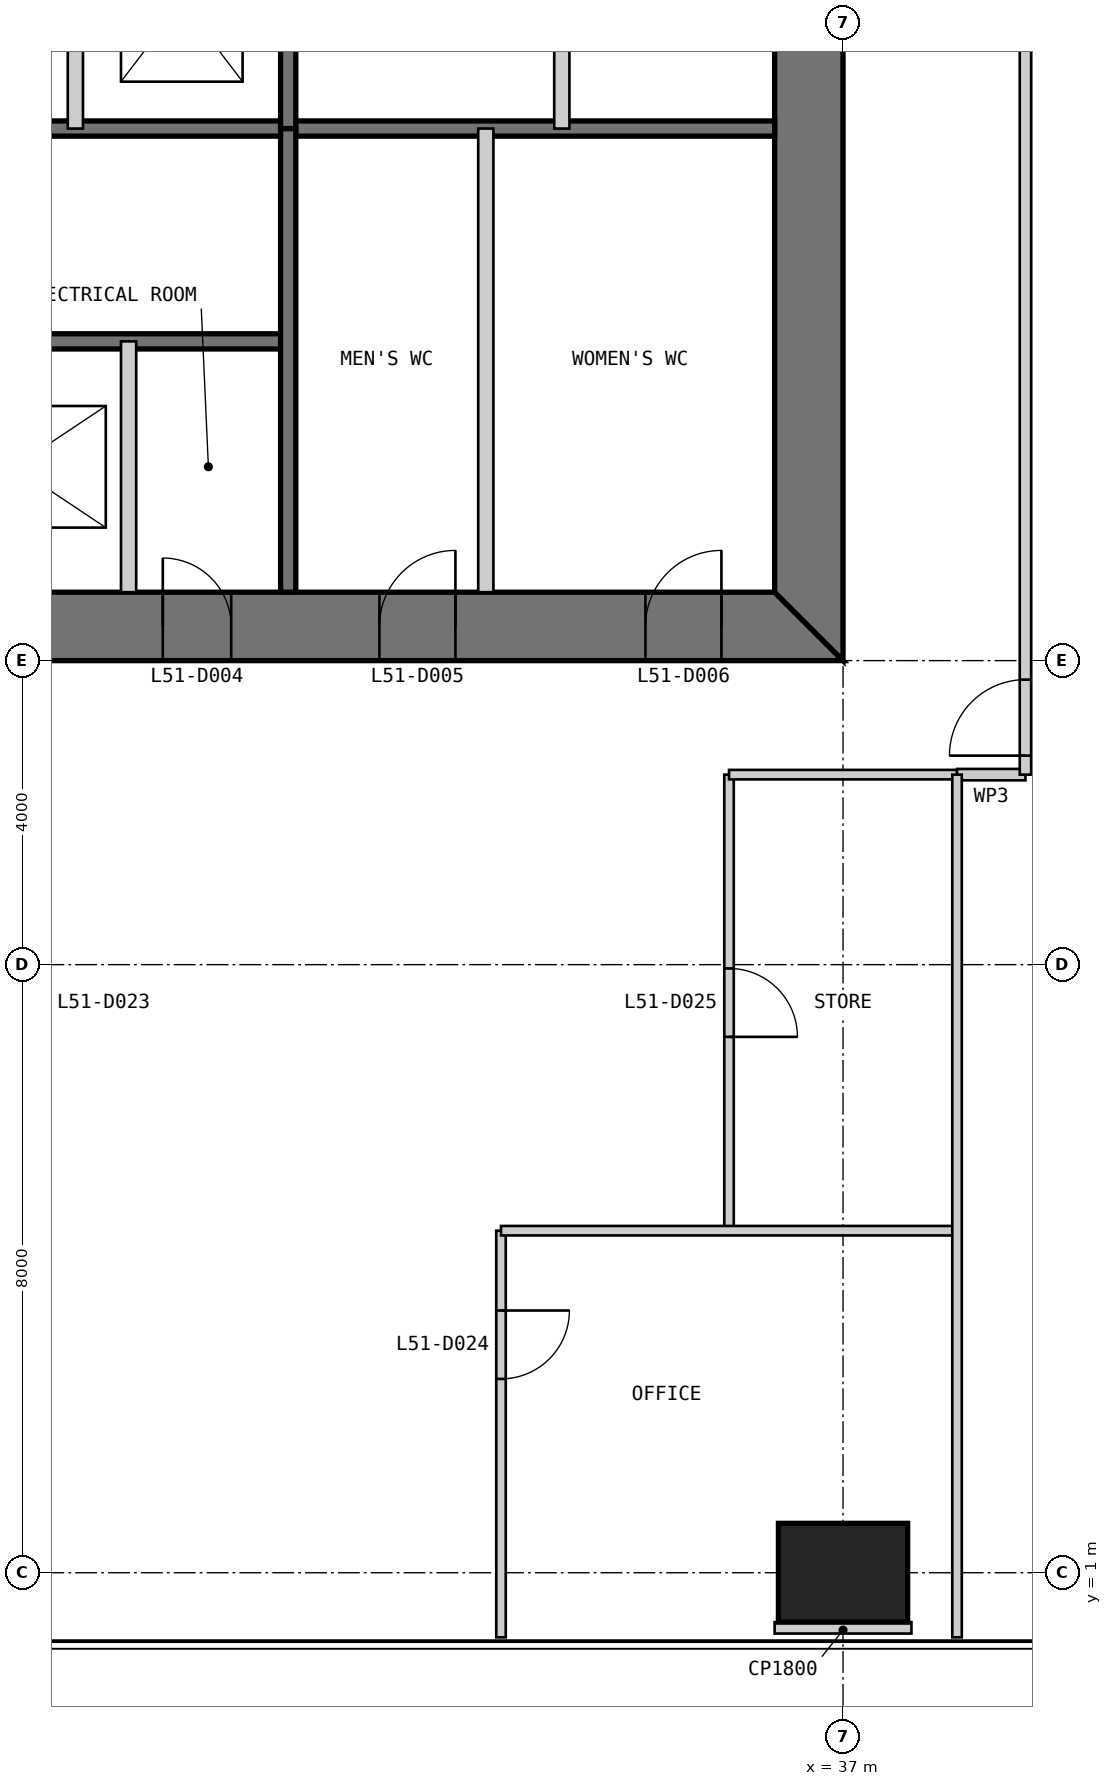
"""IFC4 building model, lengths in metres.
Left out: names, types, materials, properties, quantities, classifications, styles, units other than length and angle.
Written with IfcOpenShell. Run it as: python <this file> out.ifc"""

import sys

from ifc_helpers import new_model, si_unit, direction, frame, frame_2d, origin, origin_2d, place, context, subcontext, project, spatial, polyline, rectangle, outline, extrude, element, fill, save


model = new_model("IFC4")
c1 = context("Model", 3, precision=1e-05, world=origin(), true_north=direction((0.0, 1.0)))
c2 = subcontext(c1, "Body", "Model", "MODEL_VIEW")
j1 = project(units=[si_unit("LENGTHUNIT", "METRE"), si_unit("PLANEANGLEUNIT", "RADIAN")], contexts=[c1])
p1 = place(None, origin())
s1 = spatial("IfcSite", under=j1, at=p1, CompositionType="ELEMENT")
p2 = place(p1, origin())
s2 = spatial("IfcBuilding", under=s1, at=p2, CompositionType="ELEMENT")
p3 = place(p2, frame((0.0, 0.0, 217.8)))
s3 = spatial("IfcBuildingStorey", under=s2, at=p3, CompositionType="ELEMENT", Elevation=217.8)
p4 = place(p3, frame((37.0, 1.0, 0.0), z_axis=(0.0, 0.0, 1.0), x_axis=(1.0, 0.0, 0.0)))
e1 = element("IfcColumn", 1, at=p4, inside=s3, PredefinedType="COLUMN", context=c2, shape_type="SweptSolid", body=[
    extrude(rectangle(XDim=1.7, YDim=1.3, at=origin_2d()), origin(), (0.0, 0.0, 1.0), 4.0),
])
p5 = place(p3, frame((13.0, 13.45, 0.0), z_axis=(0.0, 0.0, 1.0), x_axis=(1.0, 0.0, 0.0)))
e2 = element("IfcWall", 2, at=p5, inside=s3, PredefinedType="SHEAR", context=c2, shape_type="SweptSolid", body=[
    extrude(outline(polyline([(0.0, -0.45), (24.0, -0.45), (23.1, 0.45), (0.9, 0.45), (0.0, -0.45)])), origin(), (0.0, 0.0, 1.0), 4.0),
])
p6 = place(p5, frame((4.9, 0.0, 0.0)))
e3 = element("IfcOpeningElement", 3, at=p6, cuts=e2, PredefinedType="OPENING", context=c2, shape_type="SweptSolid", body=[
    extrude(rectangle(XDim=1.0, YDim=2.2, at=frame_2d((0.5, 1.1))), frame((0.0, 0.46, 0.0), z_axis=(0.0, -1.0, 0.0), x_axis=(1.0, 0.0, 0.0)), (0.0, 0.0, 1.0), 0.92),
])
p7 = place(p5, frame((8.9, 0.0, 0.0)))
e4 = element("IfcOpeningElement", 4, at=p7, cuts=e2, PredefinedType="OPENING", context=c2, shape_type="SweptSolid", body=[
    extrude(rectangle(XDim=1.1, YDim=2.2, at=frame_2d((0.55, 1.1))), frame((0.0, 0.46, 0.0), z_axis=(0.0, -1.0, 0.0), x_axis=(1.0, 0.0, 0.0)), (0.0, 0.0, 1.0), 0.92),
])
p8 = place(p5, frame((15.05, 0.0, 0.0)))
e5 = element("IfcOpeningElement", 5, at=p8, cuts=e2, PredefinedType="OPENING", context=c2, shape_type="SweptSolid", body=[
    extrude(rectangle(XDim=0.9, YDim=2.2, at=frame_2d((0.45, 1.1))), frame((0.0, 0.46, 0.0), z_axis=(0.0, -1.0, 0.0), x_axis=(1.0, 0.0, 0.0)), (0.0, 0.0, 1.0), 0.92),
])
p9 = place(p5, frame((17.9, 0.0, 0.0)))
e6 = element("IfcOpeningElement", 6, at=p9, cuts=e2, PredefinedType="OPENING", context=c2, shape_type="SweptSolid", body=[
    extrude(rectangle(XDim=1.0, YDim=2.2, at=frame_2d((0.5, 1.1))), frame((0.0, 0.46, 0.0), z_axis=(0.0, -1.0, 0.0), x_axis=(1.0, 0.0, 0.0)), (0.0, 0.0, 1.0), 0.92),
])
p10 = place(p5, frame((21.4, 0.0, 0.0)))
e7 = element("IfcOpeningElement", 7, at=p10, cuts=e2, PredefinedType="OPENING", context=c2, shape_type="SweptSolid", body=[
    extrude(rectangle(XDim=1.0, YDim=2.2, at=frame_2d((0.5, 1.1))), frame((0.0, 0.46, 0.0), z_axis=(0.0, -1.0, 0.0), x_axis=(1.0, 0.0, 0.0)), (0.0, 0.0, 1.0), 0.92),
])
p11 = place(p3, frame((36.55, 13.9, 0.0), z_axis=(0.0, 0.0, 1.0), x_axis=(0.0, 1.0, 0.0)))
e8 = element("IfcWall", 8, at=p11, inside=s3, PredefinedType="SHEAR", context=c2, shape_type="SweptSolid", body=[
    extrude(outline(polyline([(-0.9, -0.45), (23.1, -0.45), (22.2, 0.45), (0.0, 0.45), (-0.9, -0.45)])), origin(), (0.0, 0.0, 1.0), 4.0),
])
p12 = place(p11, frame((20.2, 0.0, 0.0)))
e9 = element("IfcOpeningElement", 9, at=p12, cuts=e8, PredefinedType="OPENING", context=c2, shape_type="SweptSolid", body=[
    extrude(rectangle(XDim=1.0, YDim=2.2, at=frame_2d((0.5, 1.1))), frame((0.0, 0.46, 0.0), z_axis=(0.0, -1.0, 0.0), x_axis=(1.0, 0.0, 0.0)), (0.0, 0.0, 1.0), 0.92),
])
p13 = place(p11, frame((17.25, 0.0, 0.0)))
e10 = element("IfcOpeningElement", 10, at=p13, cuts=e8, PredefinedType="OPENING", context=c2, shape_type="SweptSolid", body=[
    extrude(rectangle(XDim=0.9, YDim=2.2, at=frame_2d((0.45, 1.1))), frame((0.0, 0.46, 0.0), z_axis=(0.0, -1.0, 0.0), x_axis=(1.0, 0.0, 0.0)), (0.0, 0.0, 1.0), 0.92),
])
p14 = place(p3, frame((20.3, 17.2, 0.0), z_axis=(0.0, 0.0, 1.0), x_axis=(1.0, 0.0, 0.0)))
e11 = element("IfcWall", 11, at=p14, inside=s3, PredefinedType="SOLIDWALL", context=c2, shape_type="SweptSolid", body=[
    extrude(rectangle(XDim=9.4, YDim=0.2, at=frame_2d((4.7, 0.0))), origin(), (0.0, 0.0, 1.0), 3.8),
])
p15 = place(p14, frame((0.25, 0.0, 0.0)))
e12 = element("IfcOpeningElement", 12, at=p15, cuts=e11, PredefinedType="OPENING", context=c2, shape_type="SweptSolid", body=[
    extrude(rectangle(XDim=1.0, YDim=2.2, at=frame_2d((0.5, 1.1))), frame((0.0, 0.11, 0.0), z_axis=(0.0, -1.0, 0.0), x_axis=(1.0, 0.0, 0.0)), (0.0, 0.0, 1.0), 0.22),
])
p16 = place(p3, frame((20.3, 20.0, 0.0), z_axis=(0.0, 0.0, 1.0), x_axis=(1.0, 0.0, 0.0)))
e13 = element("IfcWall", 13, at=p16, inside=s3, PredefinedType="SOLIDWALL", context=c2, shape_type="SweptSolid", body=[
    extrude(rectangle(XDim=15.8, YDim=0.2, at=frame_2d((7.9, 0.0))), origin(), (0.0, 0.0, 1.0), 3.8),
])
p17 = place(p3, frame((27.6, 13.9, 0.0), z_axis=(0.0, 0.0, 1.0), x_axis=(0.0, 1.0, 0.0)))
e14 = element("IfcWall", 14, at=p17, inside=s3, PredefinedType="PARTITIONING", context=c2, shape_type="SweptSolid", body=[
    extrude(rectangle(XDim=3.3, YDim=0.2, at=frame_2d((1.65, 0.0))), origin(), (0.0, 0.0, 1.0), 3.8),
])
p18 = place(p3, frame((29.7, 13.9, 0.0), z_axis=(0.0, 0.0, 1.0), x_axis=(0.0, 1.0, 0.0)))
e15 = element("IfcWall", 15, at=p18, inside=s3, PredefinedType="SOLIDWALL", context=c2, shape_type="SweptSolid", body=[
    extrude(rectangle(XDim=6.1, YDim=0.2, at=frame_2d((3.05, 0.0))), origin(), (0.0, 0.0, 1.0), 3.8),
])
p19 = place(p3, frame((32.3, 13.9, 0.0), z_axis=(0.0, 0.0, 1.0), x_axis=(0.0, 1.0, 0.0)))
e16 = element("IfcWall", 16, at=p19, inside=s3, PredefinedType="PARTITIONING", context=c2, shape_type="SweptSolid", body=[
    extrude(rectangle(XDim=6.1, YDim=0.2, at=frame_2d((3.05, 0.0))), origin(), (0.0, 0.0, 1.0), 3.8),
])
p20 = place(p3, frame((33.3, 36.1, 0.0), z_axis=(0.0, 0.0, 1.0), x_axis=(0.0, -1.0, 0.0)))
e17 = element("IfcWall", 17, at=p20, inside=s3, PredefinedType="PARTITIONING", context=c2, shape_type="SweptSolid", body=[
    extrude(rectangle(XDim=16.1, YDim=0.2, at=frame_2d((8.05, 0.0))), origin(), (0.0, 0.0, 1.0), 3.8),
])
p21 = place(p20, frame((3.8, 0.0, 0.0)))
e18 = element("IfcOpeningElement", 18, at=p21, cuts=e17, PredefinedType="OPENING", context=c2, shape_type="SweptSolid", body=[
    extrude(rectangle(XDim=0.9, YDim=2.2, at=frame_2d((0.45, 1.1))), frame((0.0, 0.11, 0.0), z_axis=(0.0, -1.0, 0.0), x_axis=(1.0, 0.0, 0.0)), (0.0, 0.0, 1.0), 0.22),
])
p22 = place(p3, frame((29.7, 36.1, 0.0), z_axis=(0.0, 0.0, 1.0), x_axis=(0.0, -1.0, 0.0)))
e19 = element("IfcWall", 19, at=p22, inside=s3, PredefinedType="SOLIDWALL", context=c2, shape_type="SweptSolid", body=[
    extrude(rectangle(XDim=16.1, YDim=0.2, at=frame_2d((8.05, 0.0))), origin(), (0.0, 0.0, 1.0), 3.8),
])
p23 = place(p22, frame((7.217, 0.0, 0.0)))
e20 = element("IfcOpeningElement", 20, at=p23, cuts=e19, PredefinedType="OPENING", context=c2, shape_type="SweptSolid", body=[
    extrude(rectangle(XDim=1.1, YDim=2.2, at=frame_2d((0.55, 1.1))), frame((0.0, 0.11, 0.0), z_axis=(0.0, -1.0, 0.0), x_axis=(1.0, 0.0, 0.0)), (0.0, 0.0, 1.0), 0.22),
])
p24 = place(p22, frame((10.55, 0.0, 0.0)))
e21 = element("IfcOpeningElement", 21, at=p24, cuts=e19, PredefinedType="OPENING", context=c2, shape_type="SweptSolid", body=[
    extrude(rectangle(XDim=1.1, YDim=2.2, at=frame_2d((0.55, 1.1))), frame((0.0, 0.11, 0.0), z_axis=(0.0, -1.0, 0.0), x_axis=(1.0, 0.0, 0.0)), (0.0, 0.0, 1.0), 0.22),
])
p25 = place(p22, frame((13.883, 0.0, 0.0)))
e22 = element("IfcOpeningElement", 22, at=p25, cuts=e19, PredefinedType="OPENING", context=c2, shape_type="SweptSolid", body=[
    extrude(rectangle(XDim=1.1, YDim=2.2, at=frame_2d((0.55, 1.1))), frame((0.0, 0.11, 0.0), z_axis=(0.0, -1.0, 0.0), x_axis=(1.0, 0.0, 0.0)), (0.0, 0.0, 1.0), 0.22),
])
p26 = place(p3, frame((26.9, 30.0, 0.0), z_axis=(0.0, 0.0, 1.0), x_axis=(0.0, -1.0, 0.0)))
e23 = element("IfcWall", 23, at=p26, inside=s3, PredefinedType="PARTITIONING", context=c2, shape_type="SweptSolid", body=[
    extrude(rectangle(XDim=10.0, YDim=0.2, at=frame_2d((5.0, 0.0))), origin(), (0.0, 0.0, 1.0), 3.8),
])
p27 = place(p3, frame((32.5, 0.15, 0.0), z_axis=(0.0, 0.0, 1.0), x_axis=(0.0, 1.0, 0.0)))
e24 = element("IfcWall", 24, at=p27, inside=s3, PredefinedType="PARTITIONING", context=c2, shape_type="SweptSolid", body=[
    extrude(rectangle(XDim=5.35, YDim=0.125, at=frame_2d((2.675, 0.0))), origin(), (0.0, 0.0, 1.0), 3.85),
])
p28 = place(p27, frame((3.4, 0.0, 0.0)))
e25 = element("IfcOpeningElement", 25, at=p28, cuts=e24, PredefinedType="OPENING", context=c2, shape_type="SweptSolid", body=[
    extrude(rectangle(XDim=0.9, YDim=2.2, at=frame_2d((0.45, 1.1))), frame((0.0, 0.073, 0.0), z_axis=(0.0, -1.0, 0.0), x_axis=(1.0, 0.0, 0.0)), (0.0, 0.0, 1.0), 0.145),
])
p29 = place(p3, frame((35.5, 5.5, 0.0), z_axis=(0.0, 0.0, 1.0), x_axis=(0.0, 1.0, 0.0)))
e26 = element("IfcWall", 26, at=p29, inside=s3, PredefinedType="PARTITIONING", context=c2, shape_type="SweptSolid", body=[
    extrude(rectangle(XDim=6.0, YDim=0.125, at=frame_2d((3.0, 0.0))), origin(), (0.0, 0.0, 1.0), 3.85),
])
p30 = place(p29, frame((2.55, 0.0, 0.0)))
e27 = element("IfcOpeningElement", 27, at=p30, cuts=e26, PredefinedType="OPENING", context=c2, shape_type="SweptSolid", body=[
    extrude(rectangle(XDim=0.9, YDim=2.2, at=frame_2d((0.45, 1.1))), frame((0.0, 0.073, 0.0), z_axis=(0.0, -1.0, 0.0), x_axis=(1.0, 0.0, 0.0)), (0.0, 0.0, 1.0), 0.145),
])
p31 = place(p3, frame((32.5, 5.5, 0.0), z_axis=(0.0, 0.0, 1.0), x_axis=(1.0, 0.0, 0.0)))
e28 = element("IfcWall", 28, at=p31, inside=s3, PredefinedType="PARTITIONING", context=c2, shape_type="SweptSolid", body=[
    extrude(rectangle(XDim=6.0, YDim=0.125, at=frame_2d((3.0, 0.0))), origin(), (0.0, 0.0, 1.0), 3.85),
])
p32 = place(p3, frame((35.5, 11.5, 0.0), z_axis=(0.0, 0.0, 1.0), x_axis=(1.0, 0.0, 0.0)))
e29 = element("IfcWall", 29, at=p32, inside=s3, PredefinedType="PARTITIONING", context=c2, shape_type="SweptSolid", body=[
    extrude(rectangle(XDim=3.0, YDim=0.125, at=frame_2d((1.5, 0.0))), origin(), (0.0, 0.0, 1.0), 3.85),
])
p33 = place(p3, frame((38.5, 11.5, 0.0), z_axis=(0.0, 0.0, 1.0), x_axis=(1.0, 0.0, 0.0)))
e30 = element("IfcWall", 30, at=p33, inside=s3, PredefinedType="PARTITIONING", context=c2, shape_type="SweptSolid", body=[
    extrude(rectangle(XDim=0.9, YDim=0.15, at=frame_2d((0.45, 0.0))), origin(), (0.0, 0.0, 1.0), 3.85),
])
p34 = place(p3, frame((39.4, 11.5, 0.0), z_axis=(0.0, 0.0, 1.0), x_axis=(0.0, 1.0, 0.0)))
e31 = element("IfcWall", 31, at=p34, inside=s3, PredefinedType="PARTITIONING", context=c2, shape_type="SweptSolid", body=[
    extrude(rectangle(XDim=27.0, YDim=0.15, at=frame_2d((13.5, 0.0))), origin(), (0.0, 0.0, 1.0), 3.85),
])
p35 = place(p34, frame((0.25, 0.0, 0.0)))
e32 = element("IfcOpeningElement", 32, at=p35, cuts=e31, PredefinedType="OPENING", context=c2, shape_type="SweptSolid", body=[
    extrude(rectangle(XDim=1.0, YDim=2.2, at=frame_2d((0.5, 1.1))), frame((0.0, 0.085, 0.0), z_axis=(0.0, -1.0, 0.0), x_axis=(1.0, 0.0, 0.0)), (0.0, 0.0, 1.0), 0.17),
])
p36 = place(p34, frame((22.75, 0.0, 0.0)))
e33 = element("IfcOpeningElement", 33, at=p36, cuts=e31, PredefinedType="OPENING", context=c2, shape_type="SweptSolid", body=[
    extrude(rectangle(XDim=1.0, YDim=2.2, at=frame_2d((0.5, 1.1))), frame((0.0, 0.085, 0.0), z_axis=(0.0, -1.0, 0.0), x_axis=(1.0, 0.0, 0.0)), (0.0, 0.0, 1.0), 0.17),
])
p37 = place(p3, frame((38.5, 0.15, 0.0), z_axis=(0.0, 0.0, 1.0), x_axis=(0.0, 1.0, 0.0)))
e34 = element("IfcWall", 34, at=p37, inside=s3, PredefinedType="PARTITIONING", context=c2, shape_type="SweptSolid", body=[
    extrude(rectangle(XDim=11.35, YDim=0.125, at=frame_2d((5.675, 0.0))), origin(), (0.0, 0.0, 1.0), 3.85),
])
p38 = place(p3, frame((37.0, 0.2, 0.0), z_axis=(0.0, 0.0, 1.0), x_axis=(0.0, 1.0, 0.0)))
e35 = element("IfcWall", 35, at=p38, inside=s3, PredefinedType="PARTITIONING", context=c2, shape_type="SweptSolid", body=[
    extrude(rectangle(XDim=0.15, YDim=1.8, at=frame_2d((0.075, 0.0))), origin(), (0.0, 0.0, 1.0), 3.85),
])
p39 = place(p8, origin())
e36 = element("IfcDoor", 36, at=p39, inside=s3, OperationType="SINGLE_SWING_LEFT", PredefinedType="DOOR", context=c2, shape_type="SweptSolid", body=[
    extrude(rectangle(XDim=0.9, YDim=2.2, at=frame_2d((0.45, 1.1))), frame((0.0, 0.025, 0.0), z_axis=(0.0, -1.0, 0.0), x_axis=(1.0, 0.0, 0.0)), (0.0, 0.0, 1.0), 0.05),
    extrude(outline(polyline([(0.0, 0.0), (0.04, 0.0), (0.04, 2.16), (0.86, 2.16), (0.86, 0.0), (0.9, 0.0), (0.9, 2.2), (0.0, 2.2), (0.0, 0.0)])), frame((0.0, 0.3, 0.0), z_axis=(0.0, -1.0, 0.0), x_axis=(1.0, 0.0, 0.0)), (0.0, 0.0, 1.0), 0.6),
])
fill(e5, e36)
p40 = place(p9, origin())
e37 = element("IfcDoor", 37, at=p40, inside=s3, OperationType="SINGLE_SWING_RIGHT", PredefinedType="DOOR", context=c2, shape_type="SweptSolid", body=[
    extrude(rectangle(XDim=1.0, YDim=2.2, at=frame_2d((0.5, 1.1))), frame((0.0, 0.025, 0.0), z_axis=(0.0, -1.0, 0.0), x_axis=(1.0, 0.0, 0.0)), (0.0, 0.0, 1.0), 0.05),
    extrude(outline(polyline([(0.0, 0.0), (0.04, 0.0), (0.04, 2.16), (0.96, 2.16), (0.96, 0.0), (1.0, 0.0), (1.0, 2.2), (0.0, 2.2), (0.0, 0.0)])), frame((0.0, 0.3, 0.0), z_axis=(0.0, -1.0, 0.0), x_axis=(1.0, 0.0, 0.0)), (0.0, 0.0, 1.0), 0.6),
])
fill(e6, e37)
p41 = place(p10, origin())
e38 = element("IfcDoor", 38, at=p41, inside=s3, OperationType="SINGLE_SWING_RIGHT", PredefinedType="DOOR", context=c2, shape_type="SweptSolid", body=[
    extrude(rectangle(XDim=1.0, YDim=2.2, at=frame_2d((0.5, 1.1))), frame((0.0, 0.025, 0.0), z_axis=(0.0, -1.0, 0.0), x_axis=(1.0, 0.0, 0.0)), (0.0, 0.0, 1.0), 0.05),
    extrude(outline(polyline([(0.0, 0.0), (0.04, 0.0), (0.04, 2.16), (0.96, 2.16), (0.96, 0.0), (1.0, 0.0), (1.0, 2.2), (0.0, 2.2), (0.0, 0.0)])), frame((0.0, 0.3, 0.0), z_axis=(0.0, -1.0, 0.0), x_axis=(1.0, 0.0, 0.0)), (0.0, 0.0, 1.0), 0.6),
])
fill(e7, e38)
p42 = place(p28, frame((0.9, 0.0, 0.0), z_axis=(0.0, 0.0, 1.0), x_axis=(-1.0, 0.0, 0.0)))
e39 = element("IfcDoor", 39, at=p42, inside=s3, OperationType="SINGLE_SWING_LEFT", PredefinedType="DOOR", context=c2, shape_type="SweptSolid", body=[
    extrude(rectangle(XDim=0.9, YDim=2.2, at=frame_2d((0.45, 1.1))), frame((0.0, 0.025, 0.0), z_axis=(0.0, -1.0, 0.0), x_axis=(1.0, 0.0, 0.0)), (0.0, 0.0, 1.0), 0.05),
])
fill(e25, e39)
p43 = place(p30, frame((0.9, 0.0, 0.0), z_axis=(0.0, 0.0, 1.0), x_axis=(-1.0, 0.0, 0.0)))
e40 = element("IfcDoor", 40, at=p43, inside=s3, OperationType="SINGLE_SWING_RIGHT", PredefinedType="DOOR", context=c2, shape_type="SweptSolid", body=[
    extrude(rectangle(XDim=0.9, YDim=2.2, at=frame_2d((0.45, 1.1))), frame((0.0, 0.025, 0.0), z_axis=(0.0, -1.0, 0.0), x_axis=(1.0, 0.0, 0.0)), (0.0, 0.0, 1.0), 0.05),
])
fill(e27, e40)
p44 = place(p35, origin())
e41 = element("IfcDoor", 41, at=p44, inside=s3, OperationType="SINGLE_SWING_LEFT", PredefinedType="DOOR", context=c2, shape_type="SweptSolid", body=[
    extrude(rectangle(XDim=1.0, YDim=2.2, at=frame_2d((0.5, 1.1))), frame((0.0, 0.025, 0.0), z_axis=(0.0, -1.0, 0.0), x_axis=(1.0, 0.0, 0.0)), (0.0, 0.0, 1.0), 0.05),
])
fill(e32, e41)
save(model, sys.argv[1])
